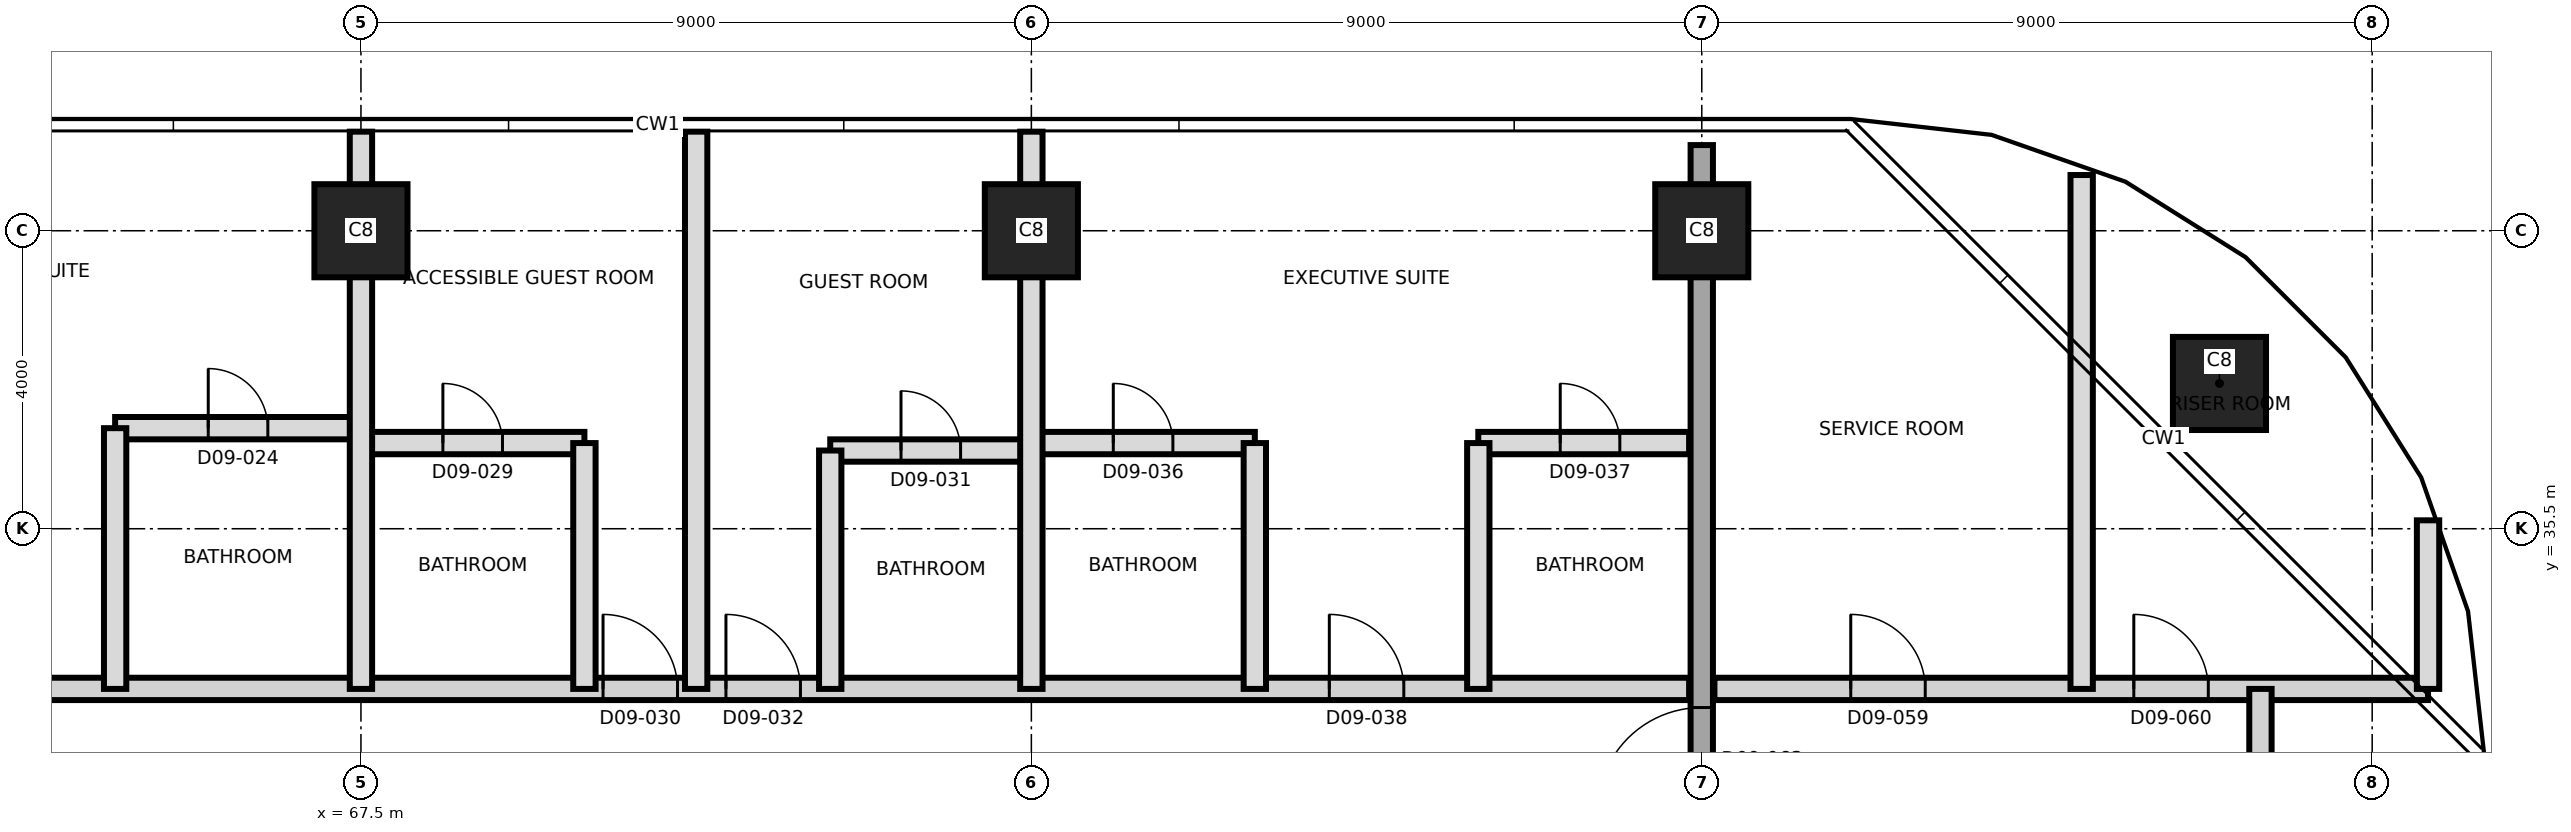
"""IFC4 building model, lengths in metres.
Left out: names, types, materials, properties, quantities, classifications, styles, units other than length and angle.
Written with IfcOpenShell. Run it as: python <this file> out.ifc"""

import sys

from ifc_helpers import new_model, si_unit, direction, frame, frame_2d, origin, origin_2d, place, context, subcontext, project, spatial, rectangle, extrude, element, fill, save


model = new_model("IFC4")
c1 = context("Model", 3, precision=1e-05, world=origin(), true_north=direction((0.0, 1.0)))
c2 = subcontext(c1, "Body", "Model", "MODEL_VIEW")
j1 = project(units=[si_unit("LENGTHUNIT", "METRE"), si_unit("PLANEANGLEUNIT", "RADIAN")], contexts=[c1])
p1 = place(None, origin())
s1 = spatial("IfcSite", under=j1, at=p1, CompositionType="ELEMENT")
p2 = place(p1, origin())
s2 = spatial("IfcBuilding", under=s1, at=p2, CompositionType="ELEMENT")
p3 = place(p2, frame((0.0, 0.0, 105.6)))
s3 = spatial("IfcBuildingStorey", under=s2, at=p3, CompositionType="ELEMENT", Elevation=105.6)
for number, where, z_axis, x_axis in (
    (1, (92.45, 37.45, 0.0), (0.0, 0.0, 1.0), (1.0, 0.0, 0.0)),
    (2, (67.5, 39.5, 0.0), (0.0, 0.0, 1.0), (1.0, 0.0, 0.0)),
    (3, (76.5, 39.5, 0.0), (0.0, 0.0, 1.0), (1.0, 0.0, 0.0)),
    (4, (85.5, 39.5, 0.0), (0.0, 0.0, 1.0), (1.0, 0.0, 0.0)),
):
    element("IfcColumn", number, at=place(p3, frame(where, z_axis=z_axis, x_axis=x_axis)), inside=s3, PredefinedType="COLUMN", context=c2, shape_type="SweptSolid", body=[
        extrude(rectangle(XDim=1.25, YDim=1.25, at=origin_2d()), origin(), (0.0, 0.0, 1.0), 3.7),
    ])
p4 = place(p3, frame((85.5, 20.35, 0.0), z_axis=(0.0, 0.0, 1.0), x_axis=(0.0, 1.0, 0.0)))
e5 = element("IfcWall", 5, at=p4, inside=s3, PredefinedType="SHEAR", context=c2, shape_type="SweptSolid", body=[
    extrude(rectangle(XDim=20.3, YDim=0.3, at=frame_2d((10.15, 0.0))), origin(), (0.0, 0.0, 1.0), 3.7),
])
p5 = place(p4, frame((11.35, 0.0, 0.0)))
e6 = element("IfcOpeningElement", 6, at=p5, cuts=e5, PredefinedType="OPENING", context=c2, shape_type="SweptSolid", body=[
    extrude(rectangle(XDim=1.4, YDim=2.1, at=frame_2d((0.7, 1.05))), frame((0.0, 0.16, 0.0), z_axis=(0.0, -1.0, 0.0), x_axis=(1.0, 0.0, 0.0)), (0.0, 0.0, 1.0), 0.32),
])
p6 = place(p3, frame((58.8, 33.35, 0.0), z_axis=(0.0, 0.0, 1.0), x_axis=(1.0, 0.0, 0.0)))
e7 = element("IfcWall", 7, at=p6, inside=s3, PredefinedType="PARTITIONING", context=c2, shape_type="SweptSolid", body=[
    extrude(rectangle(XDim=26.53, YDim=0.3, at=frame_2d((13.265, 0.0))), origin(), (0.0, 0.0, 1.0), 3.4),
])
p7 = place(p6, frame((2.05, 0.0, 0.0)))
e8 = element("IfcOpeningElement", 8, at=p7, cuts=e7, PredefinedType="OPENING", context=c2, shape_type="SweptSolid", body=[
    extrude(rectangle(XDim=1.0, YDim=2.4, at=frame_2d((0.5, 1.2))), frame((0.0, 0.16, 0.0), z_axis=(0.0, -1.0, 0.0), x_axis=(1.0, 0.0, 0.0)), (0.0, 0.0, 1.0), 0.32),
])
p8 = place(p6, frame((11.95, 0.0, 0.0)))
e9 = element("IfcOpeningElement", 9, at=p8, cuts=e7, PredefinedType="OPENING", context=c2, shape_type="SweptSolid", body=[
    extrude(rectangle(XDim=1.0, YDim=2.1, at=frame_2d((0.5, 1.05))), frame((0.0, 0.16, 0.0), z_axis=(0.0, -1.0, 0.0), x_axis=(1.0, 0.0, 0.0)), (0.0, 0.0, 1.0), 0.32),
])
p9 = place(p6, frame((13.6, 0.0, 0.0)))
e10 = element("IfcOpeningElement", 10, at=p9, cuts=e7, PredefinedType="OPENING", context=c2, shape_type="SweptSolid", body=[
    extrude(rectangle(XDim=1.0, YDim=2.1, at=frame_2d((0.5, 1.05))), frame((0.0, 0.16, 0.0), z_axis=(0.0, -1.0, 0.0), x_axis=(1.0, 0.0, 0.0)), (0.0, 0.0, 1.0), 0.32),
])
p10 = place(p6, frame((21.7, 0.0, 0.0)))
e11 = element("IfcOpeningElement", 11, at=p10, cuts=e7, PredefinedType="OPENING", context=c2, shape_type="SweptSolid", body=[
    extrude(rectangle(XDim=1.0, YDim=2.4, at=frame_2d((0.5, 1.2))), frame((0.0, 0.16, 0.0), z_axis=(0.0, -1.0, 0.0), x_axis=(1.0, 0.0, 0.0)), (0.0, 0.0, 1.0), 0.32),
])
p11 = place(p3, frame((85.67, 33.35, 0.0), z_axis=(0.0, 0.0, 1.0), x_axis=(1.0, 0.0, 0.0)))
e12 = element("IfcWall", 12, at=p11, inside=s3, PredefinedType="PARTITIONING", context=c2, shape_type="SweptSolid", body=[
    extrude(rectangle(XDim=9.58, YDim=0.3, at=frame_2d((4.79, 0.0))), origin(), (0.0, 0.0, 1.0), 3.4),
])
p12 = place(p11, frame((1.83, 0.0, 0.0)))
e13 = element("IfcOpeningElement", 13, at=p12, cuts=e12, PredefinedType="OPENING", context=c2, shape_type="SweptSolid", body=[
    extrude(rectangle(XDim=1.0, YDim=2.1, at=frame_2d((0.5, 1.05))), frame((0.0, 0.16, 0.0), z_axis=(0.0, -1.0, 0.0), x_axis=(1.0, 0.0, 0.0)), (0.0, 0.0, 1.0), 0.32),
])
p13 = place(p11, frame((5.63, 0.0, 0.0)))
e14 = element("IfcOpeningElement", 14, at=p13, cuts=e12, PredefinedType="OPENING", context=c2, shape_type="SweptSolid", body=[
    extrude(rectangle(XDim=1.0, YDim=2.1, at=frame_2d((0.5, 1.05))), frame((0.0, 0.16, 0.0), z_axis=(0.0, -1.0, 0.0), x_axis=(1.0, 0.0, 0.0)), (0.0, 0.0, 1.0), 0.32),
])
p14 = place(p3, frame((73.8, 36.55, 0.0), z_axis=(0.0, 0.0, 1.0), x_axis=(1.0, 0.0, 0.0)))
e15 = element("IfcWall", 15, at=p14, inside=s3, PredefinedType="PARTITIONING", context=c2, shape_type="SweptSolid", body=[
    extrude(rectangle(XDim=2.7, YDim=0.3, at=frame_2d((1.35, 0.0))), origin(), (0.0, 0.0, 1.0), 3.4),
])
p15 = place(p14, frame((0.95, 0.0, 0.0)))
e16 = element("IfcOpeningElement", 16, at=p15, cuts=e15, PredefinedType="OPENING", context=c2, shape_type="SweptSolid", body=[
    extrude(rectangle(XDim=0.8, YDim=2.1, at=frame_2d((0.4, 1.05))), frame((0.0, 0.16, 0.0), z_axis=(0.0, -1.0, 0.0), x_axis=(1.0, 0.0, 0.0)), (0.0, 0.0, 1.0), 0.32),
])
p16 = place(p3, frame((67.5, 36.65, 0.0), z_axis=(0.0, 0.0, 1.0), x_axis=(1.0, 0.0, 0.0)))
e17 = element("IfcWall", 17, at=p16, inside=s3, PredefinedType="PARTITIONING", context=c2, shape_type="SweptSolid", body=[
    extrude(rectangle(XDim=3.0, YDim=0.3, at=frame_2d((1.5, 0.0))), origin(), (0.0, 0.0, 1.0), 3.4),
])
p17 = place(p16, frame((1.1, 0.0, 0.0)))
e18 = element("IfcOpeningElement", 18, at=p17, cuts=e17, PredefinedType="OPENING", context=c2, shape_type="SweptSolid", body=[
    extrude(rectangle(XDim=0.8, YDim=2.1, at=frame_2d((0.4, 1.05))), frame((0.0, 0.16, 0.0), z_axis=(0.0, -1.0, 0.0), x_axis=(1.0, 0.0, 0.0)), (0.0, 0.0, 1.0), 0.32),
])
p18 = place(p3, frame((76.5, 36.65, 0.0), z_axis=(0.0, 0.0, 1.0), x_axis=(1.0, 0.0, 0.0)))
e19 = element("IfcWall", 19, at=p18, inside=s3, PredefinedType="PARTITIONING", context=c2, shape_type="SweptSolid", body=[
    extrude(rectangle(XDim=3.0, YDim=0.3, at=frame_2d((1.5, 0.0))), origin(), (0.0, 0.0, 1.0), 3.4),
])
p19 = place(p18, frame((1.1, 0.0, 0.0)))
e20 = element("IfcOpeningElement", 20, at=p19, cuts=e19, PredefinedType="OPENING", context=c2, shape_type="SweptSolid", body=[
    extrude(rectangle(XDim=0.8, YDim=2.1, at=frame_2d((0.4, 1.05))), frame((0.0, 0.16, 0.0), z_axis=(0.0, -1.0, 0.0), x_axis=(1.0, 0.0, 0.0)), (0.0, 0.0, 1.0), 0.32),
])
p20 = place(p3, frame((82.5, 36.65, 0.0), z_axis=(0.0, 0.0, 1.0), x_axis=(1.0, 0.0, 0.0)))
e21 = element("IfcWall", 21, at=p20, inside=s3, PredefinedType="PARTITIONING", context=c2, shape_type="SweptSolid", body=[
    extrude(rectangle(XDim=2.83, YDim=0.3, at=frame_2d((1.415, 0.0))), origin(), (0.0, 0.0, 1.0), 3.4),
])
p21 = place(p20, frame((1.1, 0.0, 0.0)))
e22 = element("IfcOpeningElement", 22, at=p21, cuts=e21, PredefinedType="OPENING", context=c2, shape_type="SweptSolid", body=[
    extrude(rectangle(XDim=0.8, YDim=2.1, at=frame_2d((0.4, 1.05))), frame((0.0, 0.16, 0.0), z_axis=(0.0, -1.0, 0.0), x_axis=(1.0, 0.0, 0.0)), (0.0, 0.0, 1.0), 0.32),
])
p22 = place(p3, frame((64.2, 36.85, 0.0), z_axis=(0.0, 0.0, 1.0), x_axis=(1.0, 0.0, 0.0)))
e23 = element("IfcWall", 23, at=p22, inside=s3, PredefinedType="PARTITIONING", context=c2, shape_type="SweptSolid", body=[
    extrude(rectangle(XDim=3.3, YDim=0.3, at=frame_2d((1.65, 0.0))), origin(), (0.0, 0.0, 1.0), 3.4),
])
p23 = place(p22, frame((1.25, 0.0, 0.0)))
e24 = element("IfcOpeningElement", 24, at=p23, cuts=e23, PredefinedType="OPENING", context=c2, shape_type="SweptSolid", body=[
    extrude(rectangle(XDim=0.8, YDim=2.1, at=frame_2d((0.4, 1.05))), frame((0.0, 0.16, 0.0), z_axis=(0.0, -1.0, 0.0), x_axis=(1.0, 0.0, 0.0)), (0.0, 0.0, 1.0), 0.32),
])
p24 = place(p3, frame((64.2, 33.35, 0.0), z_axis=(0.0, 0.0, 1.0), x_axis=(0.0, 1.0, 0.0)))
e25 = element("IfcWall", 25, at=p24, inside=s3, PredefinedType="PARTITIONING", context=c2, shape_type="SweptSolid", body=[
    extrude(rectangle(XDim=3.5, YDim=0.3, at=frame_2d((1.75, 0.0))), origin(), (0.0, 0.0, 1.0), 3.4),
])
p25 = place(p3, frame((67.5, 33.35, 0.0), z_axis=(0.0, 0.0, 1.0), x_axis=(0.0, 1.0, 0.0)))
e26 = element("IfcWall", 26, at=p25, inside=s3, PredefinedType="PARTITIONING", context=c2, shape_type="SweptSolid", body=[
    extrude(rectangle(XDim=7.48, YDim=0.3, at=frame_2d((3.74, 0.0))), origin(), (0.0, 0.0, 1.0), 3.4),
])
p26 = place(p3, frame((70.5, 33.35, 0.0), z_axis=(0.0, 0.0, 1.0), x_axis=(0.0, 1.0, 0.0)))
e27 = element("IfcWall", 27, at=p26, inside=s3, PredefinedType="PARTITIONING", context=c2, shape_type="SweptSolid", body=[
    extrude(rectangle(XDim=3.3, YDim=0.3, at=frame_2d((1.65, 0.0))), origin(), (0.0, 0.0, 1.0), 3.4),
])
p27 = place(p3, frame((72.0, 33.35, 0.0), z_axis=(0.0, 0.0, 1.0), x_axis=(0.0, 1.0, 0.0)))
e28 = element("IfcWall", 28, at=p27, inside=s3, PredefinedType="PARTITIONING", context=c2, shape_type="SweptSolid", body=[
    extrude(rectangle(XDim=7.48, YDim=0.3, at=frame_2d((3.74, 0.0))), origin(), (0.0, 0.0, 1.0), 3.4),
])
p28 = place(p3, frame((73.8, 33.35, 0.0), z_axis=(0.0, 0.0, 1.0), x_axis=(0.0, 1.0, 0.0)))
e29 = element("IfcWall", 29, at=p28, inside=s3, PredefinedType="PARTITIONING", context=c2, shape_type="SweptSolid", body=[
    extrude(rectangle(XDim=3.2, YDim=0.3, at=frame_2d((1.6, 0.0))), origin(), (0.0, 0.0, 1.0), 3.4),
])
p29 = place(p3, frame((76.5, 33.35, 0.0), z_axis=(0.0, 0.0, 1.0), x_axis=(0.0, 1.0, 0.0)))
e30 = element("IfcWall", 30, at=p29, inside=s3, PredefinedType="PARTITIONING", context=c2, shape_type="SweptSolid", body=[
    extrude(rectangle(XDim=7.48, YDim=0.3, at=frame_2d((3.74, 0.0))), origin(), (0.0, 0.0, 1.0), 3.4),
])
for number, where, z_axis, x_axis in (
    (31, (79.5, 33.35, 0.0), (0.0, 0.0, 1.0), (0.0, 1.0, 0.0)),
    (32, (82.5, 33.35, 0.0), (0.0, 0.0, 1.0), (0.0, 1.0, 0.0)),
):
    element("IfcWall", number, at=place(p3, frame(where, z_axis=z_axis, x_axis=x_axis)), inside=s3, PredefinedType="PARTITIONING", context=c2, shape_type="SweptSolid", body=[
        extrude(rectangle(XDim=3.3, YDim=0.3, at=frame_2d((1.65, 0.0))), origin(), (0.0, 0.0, 1.0), 3.4),
    ])
p30 = place(p3, frame((90.6, 33.35, 0.0), z_axis=(0.0, 0.0, 1.0), x_axis=(0.0, 1.0, 0.0)))
e33 = element("IfcWall", 33, at=p30, inside=s3, PredefinedType="PARTITIONING", context=c2, shape_type="SweptSolid", body=[
    extrude(rectangle(XDim=6.898, YDim=0.3, at=frame_2d((3.449, 0.0))), origin(), (0.0, 0.0, 1.0), 3.4),
])
p31 = place(p3, frame((93.0, 30.65, 0.0), z_axis=(0.0, 0.0, 1.0), x_axis=(0.0, 1.0, 0.0)))
e34 = element("IfcWall", 34, at=p31, inside=s3, PredefinedType="PARTITIONING", context=c2, shape_type="SweptSolid", body=[
    extrude(rectangle(XDim=2.7, YDim=0.3, at=frame_2d((1.35, 0.0))), origin(), (0.0, 0.0, 1.0), 3.4),
])
p32 = place(p3, frame((95.25, 33.35, 0.0), z_axis=(0.0, 0.0, 1.0), x_axis=(0.0, 1.0, 0.0)))
e35 = element("IfcWall", 35, at=p32, inside=s3, PredefinedType="PARTITIONING", context=c2, shape_type="SweptSolid", body=[
    extrude(rectangle(XDim=2.263, YDim=0.3, at=frame_2d((1.131, 0.0))), origin(), (0.0, 0.0, 1.0), 3.4),
])
p33 = place(p23, origin())
e36 = element("IfcDoor", 36, at=p33, inside=s3, OperationType="SINGLE_SWING_LEFT", PredefinedType="DOOR", context=c2, shape_type="SweptSolid", body=[
    extrude(rectangle(XDim=0.8, YDim=2.1, at=frame_2d((0.4, 1.05))), frame((0.0, 0.025, 0.0), z_axis=(0.0, -1.0, 0.0), x_axis=(1.0, 0.0, 0.0)), (0.0, 0.0, 1.0), 0.05),
])
fill(e24, e36)
p34 = place(p17, origin())
e37 = element("IfcDoor", 37, at=p34, inside=s3, OperationType="SINGLE_SWING_LEFT", PredefinedType="DOOR", context=c2, shape_type="SweptSolid", body=[
    extrude(rectangle(XDim=0.8, YDim=2.1, at=frame_2d((0.4, 1.05))), frame((0.0, 0.025, 0.0), z_axis=(0.0, -1.0, 0.0), x_axis=(1.0, 0.0, 0.0)), (0.0, 0.0, 1.0), 0.05),
])
fill(e18, e37)
p35 = place(p8, origin())
e38 = element("IfcDoor", 38, at=p35, inside=s3, OperationType="SINGLE_SWING_RIGHT", PredefinedType="DOOR", context=c2, shape_type="SweptSolid", body=[
    extrude(rectangle(XDim=1.0, YDim=2.1, at=frame_2d((0.5, 1.05))), frame((0.0, 0.025, 0.0), z_axis=(0.0, -1.0, 0.0), x_axis=(1.0, 0.0, 0.0)), (0.0, 0.0, 1.0), 0.05),
])
fill(e9, e38)
p36 = place(p15, origin())
e39 = element("IfcDoor", 39, at=p36, inside=s3, OperationType="SINGLE_SWING_RIGHT", PredefinedType="DOOR", context=c2, shape_type="SweptSolid", body=[
    extrude(rectangle(XDim=0.8, YDim=2.1, at=frame_2d((0.4, 1.05))), frame((0.0, 0.025, 0.0), z_axis=(0.0, -1.0, 0.0), x_axis=(1.0, 0.0, 0.0)), (0.0, 0.0, 1.0), 0.05),
])
fill(e16, e39)
p37 = place(p9, origin())
e40 = element("IfcDoor", 40, at=p37, inside=s3, OperationType="SINGLE_SWING_LEFT", PredefinedType="DOOR", context=c2, shape_type="SweptSolid", body=[
    extrude(rectangle(XDim=1.0, YDim=2.1, at=frame_2d((0.5, 1.05))), frame((0.0, 0.025, 0.0), z_axis=(0.0, -1.0, 0.0), x_axis=(1.0, 0.0, 0.0)), (0.0, 0.0, 1.0), 0.05),
])
fill(e10, e40)
p38 = place(p19, origin())
e41 = element("IfcDoor", 41, at=p38, inside=s3, OperationType="SINGLE_SWING_LEFT", PredefinedType="DOOR", context=c2, shape_type="SweptSolid", body=[
    extrude(rectangle(XDim=0.8, YDim=2.1, at=frame_2d((0.4, 1.05))), frame((0.0, 0.025, 0.0), z_axis=(0.0, -1.0, 0.0), x_axis=(1.0, 0.0, 0.0)), (0.0, 0.0, 1.0), 0.05),
])
fill(e20, e41)
p39 = place(p21, origin())
e42 = element("IfcDoor", 42, at=p39, inside=s3, OperationType="SINGLE_SWING_RIGHT", PredefinedType="DOOR", context=c2, shape_type="SweptSolid", body=[
    extrude(rectangle(XDim=0.8, YDim=2.1, at=frame_2d((0.4, 1.05))), frame((0.0, 0.025, 0.0), z_axis=(0.0, -1.0, 0.0), x_axis=(1.0, 0.0, 0.0)), (0.0, 0.0, 1.0), 0.05),
])
fill(e22, e42)
p40 = place(p10, origin())
e43 = element("IfcDoor", 43, at=p40, inside=s3, OperationType="SINGLE_SWING_LEFT", PredefinedType="DOOR", context=c2, shape_type="SweptSolid", body=[
    extrude(rectangle(XDim=1.0, YDim=2.4, at=frame_2d((0.5, 1.2))), frame((0.0, 0.025, 0.0), z_axis=(0.0, -1.0, 0.0), x_axis=(1.0, 0.0, 0.0)), (0.0, 0.0, 1.0), 0.05),
])
fill(e11, e43)
p41 = place(p12, origin())
e44 = element("IfcDoor", 44, at=p41, inside=s3, OperationType="SINGLE_SWING_LEFT", PredefinedType="DOOR", context=c2, shape_type="SweptSolid", body=[
    extrude(rectangle(XDim=1.0, YDim=2.1, at=frame_2d((0.5, 1.05))), frame((0.0, 0.025, 0.0), z_axis=(0.0, -1.0, 0.0), x_axis=(1.0, 0.0, 0.0)), (0.0, 0.0, 1.0), 0.05),
])
fill(e13, e44)
p42 = place(p13, origin())
e45 = element("IfcDoor", 45, at=p42, inside=s3, OperationType="SINGLE_SWING_RIGHT", PredefinedType="DOOR", context=c2, shape_type="SweptSolid", body=[
    extrude(rectangle(XDim=1.0, YDim=2.1, at=frame_2d((0.5, 1.05))), frame((0.0, 0.025, 0.0), z_axis=(0.0, -1.0, 0.0), x_axis=(1.0, 0.0, 0.0)), (0.0, 0.0, 1.0), 0.05),
])
fill(e14, e45)
p43 = place(p5, origin())
e46 = element("IfcDoor", 46, at=p43, inside=s3, OperationType="SINGLE_SWING_RIGHT", PredefinedType="DOOR", context=c2, shape_type="SweptSolid", body=[
    extrude(rectangle(XDim=1.4, YDim=2.1, at=frame_2d((0.7, 1.05))), frame((0.0, 0.025, 0.0), z_axis=(0.0, -1.0, 0.0), x_axis=(1.0, 0.0, 0.0)), (0.0, 0.0, 1.0), 0.05),
])
fill(e6, e46)
save(model, sys.argv[1])
